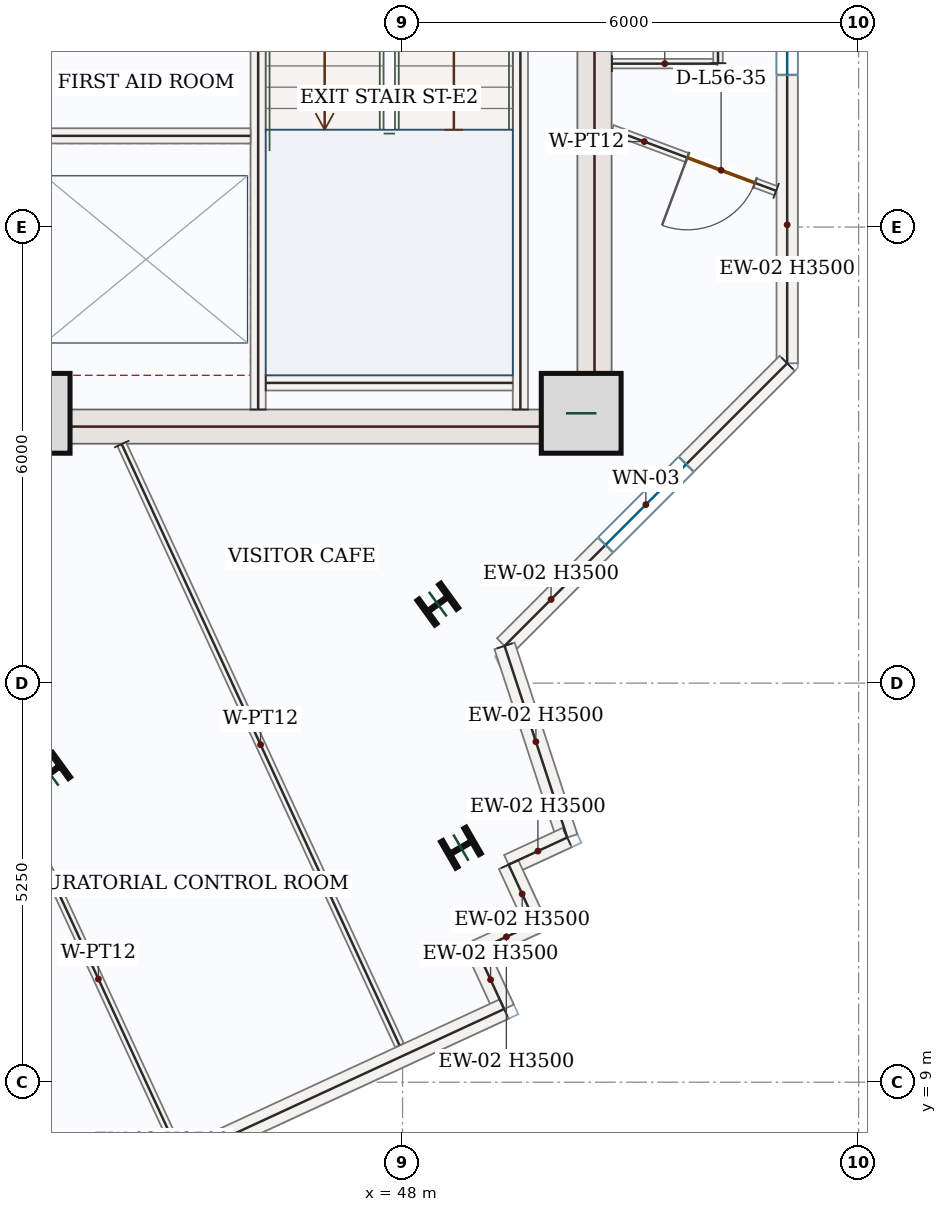
"""IFC4 building model, lengths in metres.
Left out: names, types, materials, properties, quantities, classifications, styles, units other than length and angle.
Written with IfcOpenShell. Run it as: python <this file> out.ifc"""

import sys

from ifc_helpers import new_model, si_unit, direction, frame, frame_2d, origin, origin_2d, place, context, subcontext, project, spatial, rectangle, i_section, extrude, source, transform, mapped, element, fill, save


model = new_model("IFC4")
c1 = context("Model", 3, precision=1e-05, world=origin(), true_north=direction((0.0, 1.0)))
c2 = subcontext(c1, "Body", "Model", "MODEL_VIEW")
j1 = project(units=[si_unit("LENGTHUNIT", "METRE"), si_unit("PLANEANGLEUNIT", "RADIAN")], contexts=[c1])
p1 = place(None, origin())
s1 = spatial("IfcSite", under=j1, at=p1, CompositionType="ELEMENT")
p2 = place(p1, origin())
s2 = spatial("IfcBuilding", under=s1, at=p2, CompositionType="ELEMENT")
p3 = place(p2, frame((0.0, 0.0, 239.1)))
s3 = spatial("IfcBuildingStorey", under=s2, at=p3, CompositionType="ELEMENT", Elevation=239.1)
m1 = source(origin(), c2, "Body", "SweptSolid", [
    extrude(rectangle(XDim=8.55, YDim=0.45, at=frame_2d((4.275, 0.0))), origin(), (0.0, 0.0, 1.0), 3.5),
])
p4 = place(p3, frame((50.525, 17.4, 0.0), z_axis=(0.0, 0.0, 1.0), x_axis=(0.0, 1.0, 0.0)))
e1 = element("IfcWall", 1, at=p4, inside=s3, PredefinedType="SHEAR", context=c2, shape_type="MappedRepresentation", body=[
    mapped(m1, transform((0.0, 0.0, 0.0), x_axis=(1.0, 0.0, 0.0), y_axis=(0.0, 1.0, 0.0), z_axis=(0.0, 0.0, 1.0), scale=1.0)),
])
m2 = source(origin(), c2, "Body", "SweptSolid", [
    extrude(rectangle(XDim=7.1, YDim=0.45, at=frame_2d((3.55, 0.0))), origin(), (0.0, 0.0, 1.0), 3.5),
])
p5 = place(p3, frame((43.2, 17.625, 0.0), z_axis=(0.0, 0.0, 1.0), x_axis=(1.0, 0.0, 0.0)))
e2 = element("IfcWall", 2, at=p5, inside=s3, PredefinedType="SHEAR", context=c2, shape_type="MappedRepresentation", body=[
    mapped(m2, transform((0.0, 0.0, 0.0), x_axis=(1.0, 0.0, 0.0), y_axis=(0.0, 1.0, 0.0), z_axis=(0.0, 0.0, 1.0), scale=1.0)),
])
m3 = source(origin(), c2, "Body", "SweptSolid", [
    extrude(rectangle(XDim=1.05, YDim=1.05, at=origin_2d()), origin(), (0.0, 0.0, 1.0), 3.75),
])
for number, where, z_axis, x_axis in (
    (3, (43.1, 17.8, 0.0), (0.0, 0.0, 1.0), (1.0, 0.0, 0.0)),
    (4, (50.35, 17.8, 0.0), (0.0, 0.0, 1.0), (1.0, 0.0, 0.0)),
):
    element("IfcColumn", number, at=place(p3, frame(where, z_axis=z_axis, x_axis=x_axis)), inside=s3, PredefinedType="COLUMN", context=c2, shape_type="MappedRepresentation", body=[
        mapped(m3, transform((0.0, 0.0, 0.0), x_axis=(1.0, 0.0, 0.0), y_axis=(0.0, 1.0, 0.0), z_axis=(0.0, 0.0, 1.0), scale=1.0)),
    ])
m4 = source(origin(), c2, "Body", "SweptSolid", [
    extrude(i_section(OverallWidth=0.399, OverallDepth=0.386, WebThickness=0.021, FlangeThickness=0.033, FilletRadius=0.018, at=origin_2d()), origin(), (0.0, 0.0, 1.0), 3.75),
])
for number, where, z_axis, x_axis in (
    (5, (43.357, 13.063, 0.0), (0.0, 0.0, 1.0), (-0.588, 0.809, 0.0)),
    (6, (48.464, 15.289, 0.0), (0.0, 0.0, 1.0), (-0.588, 0.809, 0.0)),
    (7, (48.768, 12.086, 0.0), (0.0, 0.0, 1.0), (-0.5, 0.866, 0.0)),
):
    element("IfcColumn", number, at=place(p3, frame(where, z_axis=z_axis, x_axis=x_axis)), inside=s3, PredefinedType="COLUMN", context=c2, shape_type="MappedRepresentation", body=[
        mapped(m4, transform((0.0, 0.0, 0.0), x_axis=(1.0, 0.0, 0.0), y_axis=(0.0, 1.0, 0.0), z_axis=(0.0, 0.0, 1.0), scale=1.0)),
    ])
p6 = place(p3, frame((53.06, 27.546, 0.0), z_axis=(0.0, 0.0, 1.0), x_axis=(0.0, -1.0, 0.0)))
e8 = element("IfcWall", 8, at=p6, inside=s3, PredefinedType="SOLIDWALL", context=c2, shape_type="SweptSolid", body=[
    extrude(rectangle(XDim=9.088, YDim=0.28, at=frame_2d((4.544, 0.0))), origin(), (0.0, 0.0, 1.0), 3.5),
])
p7 = place(p6, frame((3.794, 0.0, 0.85)))
e9 = element("IfcOpeningElement", 9, at=p7, cuts=e8, PredefinedType="OPENING", context=c2, shape_type="SweptSolid", body=[
    extrude(rectangle(XDim=1.5, YDim=1.5, at=frame_2d((0.75, 0.75))), frame((0.0, 0.15, 0.0), z_axis=(0.0, -1.0, 0.0), x_axis=(1.0, 0.0, 0.0)), (0.0, 0.0, 1.0), 0.3),
])
p8 = place(p3, frame((53.06, 18.458, 0.0), z_axis=(0.0, 0.0, 1.0), x_axis=(-0.707106781187, -0.707106781187, 0.0)))
e10 = element("IfcWall", 10, at=p8, inside=s3, PredefinedType="SOLIDWALL", context=c2, shape_type="SweptSolid", body=[
    extrude(rectangle(XDim=5.258, YDim=0.28, at=frame_2d((2.629, 0.0))), origin(), (0.0, 0.0, 1.0), 3.5),
])
p9 = place(p8, frame((1.879, 0.0, 0.85)))
e11 = element("IfcOpeningElement", 11, at=p9, cuts=e10, PredefinedType="OPENING", context=c2, shape_type="SweptSolid", body=[
    extrude(rectangle(XDim=1.5, YDim=1.5, at=frame_2d((0.75, 0.75))), frame((0.0, 0.15, 0.0), z_axis=(0.0, -1.0, 0.0), x_axis=(1.0, 0.0, 0.0)), (0.0, 0.0, 1.0), 0.3),
])
m5 = source(origin(), c2, "Body", "SweptSolid", [
    extrude(rectangle(XDim=2.652, YDim=0.28, at=frame_2d((1.326, 0.0))), origin(), (0.0, 0.0, 1.0), 3.5),
])
p10 = place(p3, frame((49.342, 14.74, 0.0), z_axis=(0.0, 0.0, 1.0), x_axis=(0.310838004308, -0.950462905682, 0.0)))
e12 = element("IfcWall", 12, at=p10, inside=s3, PredefinedType="SOLIDWALL", context=c2, shape_type="MappedRepresentation", body=[
    mapped(m5, transform((0.0, 0.0, 0.0), x_axis=(1.0, 0.0, 0.0), y_axis=(0.0, 1.0, 0.0), z_axis=(0.0, 0.0, 1.0), scale=1.0)),
])
m6 = source(origin(), c2, "Body", "SweptSolid", [
    extrude(rectangle(XDim=0.85, YDim=0.28, at=frame_2d((0.425, 0.0))), origin(), (0.0, 0.0, 1.0), 3.5),
])
for number, where, z_axis, x_axis in (
    (13, (50.167, 12.219, 0.0), (0.0, 0.0, 1.0), (-0.908, -0.419, 0.0)),
    (14, (49.395, 11.863, 0.0), (0.0, 0.0, 1.0), (0.419, -0.908, 0.0)),
):
    element("IfcWall", number, at=place(p3, frame(where, z_axis=z_axis, x_axis=x_axis)), inside=s3, PredefinedType="SOLIDWALL", context=c2, shape_type="MappedRepresentation", body=[
        mapped(m6, transform((0.0, 0.0, 0.0), x_axis=(1.0, 0.0, 0.0), y_axis=(0.0, 1.0, 0.0), z_axis=(0.0, 0.0, 1.0), scale=1.0)),
    ])
m7 = source(origin(), c2, "Body", "SweptSolid", [
    extrude(rectangle(XDim=0.85, YDim=0.28, at=frame_2d((0.425, 0.0))), origin(), (0.0, 0.0, 1.0), 3.5),
])
p11 = place(p3, frame((49.751, 11.091, 0.0), z_axis=(0.0, 0.0, 1.0), x_axis=(-0.907791150023, -0.419422493365, 0.0)))
e15 = element("IfcWall", 15, at=p11, inside=s3, PredefinedType="SOLIDWALL", context=c2, shape_type="MappedRepresentation", body=[
    mapped(m7, transform((0.0, 0.0, 0.0), x_axis=(1.0, 0.0, 0.0), y_axis=(0.0, 1.0, 0.0), z_axis=(0.0, 0.0, 1.0), scale=1.0)),
])
p12 = place(p3, frame((48.98, 10.734, 0.0), z_axis=(0.0, 0.0, 1.0), x_axis=(0.419313139191, -0.907841666427, 0.0)))
e16 = element("IfcWall", 16, at=p12, inside=s3, PredefinedType="SOLIDWALL", context=c2, shape_type="MappedRepresentation", body=[
    mapped(m6, transform((0.0, 0.0, 0.0), x_axis=(1.0, 0.0, 0.0), y_axis=(0.0, 1.0, 0.0), z_axis=(0.0, 0.0, 1.0), scale=1.0)),
])
m8 = source(origin(), c2, "Body", "SweptSolid", [
    extrude(rectangle(XDim=9.92, YDim=0.28, at=frame_2d((4.96, 0.0))), origin(), (0.0, 0.0, 1.0), 3.5),
])
p13 = place(p3, frame((49.336, 9.963, 0.0), z_axis=(0.0, 0.0, 1.0), x_axis=(-0.907779940536, -0.419446754143, 0.0)))
e17 = element("IfcWall", 17, at=p13, inside=s3, PredefinedType="SOLIDWALL", context=c2, shape_type="MappedRepresentation", body=[
    mapped(m8, transform((0.0, 0.0, 0.0), x_axis=(1.0, 0.0, 0.0), y_axis=(0.0, 1.0, 0.0), z_axis=(0.0, 0.0, 1.0), scale=1.0)),
])
m9 = source(origin(), c2, "Body", "SweptSolid", [
    extrude(rectangle(XDim=7.87, YDim=0.2, at=frame_2d((3.935, 0.0))), origin(), (0.0, 0.0, 1.0), 3.5),
])
p14 = place(p3, frame((49.55, 17.85, 0.0), z_axis=(0.0, 0.0, 1.0), x_axis=(0.0, 1.0, 0.0)))
e18 = element("IfcWall", 18, at=p14, inside=s3, PredefinedType="SOLIDWALL", context=c2, shape_type="MappedRepresentation", body=[
    mapped(m9, transform((0.0, 0.0, 0.0), x_axis=(1.0, 0.0, 0.0), y_axis=(0.0, 1.0, 0.0), z_axis=(0.0, 0.0, 1.0), scale=1.0)),
])
p15 = place(p3, frame((46.1, 17.85, 0.0), z_axis=(0.0, 0.0, 1.0), x_axis=(0.0, 1.0, 0.0)))
e19 = element("IfcWall", 19, at=p15, inside=s3, PredefinedType="SOLIDWALL", context=c2, shape_type="SweptSolid", body=[
    extrude(rectangle(XDim=8.0, YDim=0.2, at=frame_2d((4.0, 0.0))), origin(), (0.0, 0.0, 1.0), 3.5),
])
p16 = place(p15, frame((6.3, 0.0, 0.0)))
e20 = element("IfcOpeningElement", 20, at=p16, cuts=e19, PredefinedType="OPENING", context=c2, shape_type="SweptSolid", body=[
    extrude(rectangle(XDim=1.05, YDim=2.15, at=frame_2d((0.525, 1.075))), frame((0.0, 0.11, 0.0), z_axis=(0.0, -1.0, 0.0), x_axis=(1.0, 0.0, 0.0)), (0.0, 0.0, 1.0), 0.22),
])
m10 = source(origin(), c2, "Body", "SweptSolid", [
    extrude(rectangle(XDim=3.25, YDim=0.2, at=frame_2d((1.625, 0.0))), origin(), (0.0, 0.0, 1.0), 3.5),
])
p17 = place(p3, frame((46.2, 18.2, 0.0), z_axis=(0.0, 0.0, 1.0), x_axis=(1.0, 0.0, 0.0)))
e21 = element("IfcWall", 21, at=p17, inside=s3, PredefinedType="SOLIDWALL", context=c2, shape_type="MappedRepresentation", body=[
    mapped(m10, transform((0.0, 0.0, 0.0), x_axis=(1.0, 0.0, 0.0), y_axis=(0.0, 1.0, 0.0), z_axis=(0.0, 0.0, 1.0), scale=1.0)),
])
m11 = source(origin(), c2, "Body", "SweptSolid", [
    extrude(rectangle(XDim=2.75, YDim=0.2, at=frame_2d((1.375, 0.0))), origin(), (0.0, 0.0, 1.0), 3.5),
])
p18 = place(p3, frame((43.25, 21.45, 0.0), z_axis=(0.0, 0.0, 1.0), x_axis=(1.0, 0.0, 0.0)))
e22 = element("IfcWall", 22, at=p18, inside=s3, PredefinedType="SOLIDWALL", context=c2, shape_type="MappedRepresentation", body=[
    mapped(m11, transform((0.0, 0.0, 0.0), x_axis=(1.0, 0.0, 0.0), y_axis=(0.0, 1.0, 0.0), z_axis=(0.0, 0.0, 1.0), scale=1.0)),
])
m12 = source(origin(), c2, "Body", "SweptSolid", [
    extrude(rectangle(XDim=4.904, YDim=0.125, at=frame_2d((2.452, 0.0))), origin(), (0.0, 0.0, 1.0), 3.5),
])
p19 = place(p3, frame((45.027, 8.131, 0.0), z_axis=(0.0, 0.0, 1.0), x_axis=(-0.419459107568, 0.907774232438, 0.0)))
e23 = element("IfcWall", 23, at=p19, inside=s3, PredefinedType="PARTITIONING", context=c2, shape_type="MappedRepresentation", body=[
    mapped(m12, transform((0.0, 0.0, 0.0), x_axis=(1.0, 0.0, 0.0), y_axis=(0.0, 1.0, 0.0), z_axis=(0.0, 0.0, 1.0), scale=1.0)),
])
m13 = source(origin(), c2, "Body", "SweptSolid", [
    extrude(rectangle(XDim=8.712, YDim=0.125, at=frame_2d((4.356, 0.0))), origin(), (0.0, 0.0, 1.0), 3.5),
])
p20 = place(p3, frame((44.305, 17.395, 0.0), z_axis=(0.0, 0.0, 1.0), x_axis=(0.419438424399, -0.907783789312, 0.0)))
e24 = element("IfcWall", 24, at=p20, inside=s3, PredefinedType="PARTITIONING", context=c2, shape_type="MappedRepresentation", body=[
    mapped(m13, transform((0.0, 0.0, 0.0), x_axis=(1.0, 0.0, 0.0), y_axis=(0.0, 1.0, 0.0), z_axis=(0.0, 0.0, 1.0), scale=1.0)),
])
m14 = source(origin(), c2, "Body", "SweptSolid", [
    extrude(rectangle(XDim=1.389, YDim=0.125, at=frame_2d((0.695, 0.0))), origin(), (0.0, 0.0, 1.0), 3.5),
])
p21 = place(p3, frame((50.755, 22.4, 0.0), z_axis=(0.0, 0.0, 1.0), x_axis=(1.0, 0.0, 0.0)))
e25 = element("IfcWall", 25, at=p21, inside=s3, PredefinedType="PARTITIONING", context=c2, shape_type="MappedRepresentation", body=[
    mapped(m14, transform((0.0, 0.0, 0.0), x_axis=(1.0, 0.0, 0.0), y_axis=(0.0, 1.0, 0.0), z_axis=(0.0, 0.0, 1.0), scale=1.0)),
])
p22 = place(p3, frame((52.15, 22.406, 0.0), z_axis=(0.0, 0.0, 1.0), x_axis=(-2.657666e-05, 0.999999999647, 0.0)))
e26 = element("IfcWall", 26, at=p22, inside=s3, PredefinedType="PARTITIONING", context=c2, shape_type="SweptSolid", body=[
    extrude(rectangle(XDim=9.186, YDim=0.125, at=frame_2d((4.593, 0.0))), origin(), (0.0, 0.0, 1.0), 3.5),
])
p23 = place(p22, frame((5.354, 0.0, 0.0)))
e27 = element("IfcOpeningElement", 27, at=p23, cuts=e26, PredefinedType="OPENING", context=c2, shape_type="SweptSolid", body=[
    extrude(rectangle(XDim=0.95, YDim=2.15, at=frame_2d((0.475, 1.075))), frame((0.0, 0.073, 0.0), z_axis=(0.0, -1.0, 0.0), x_axis=(1.0, 0.0, 0.0)), (0.0, 0.0, 1.0), 0.145),
])
p24 = place(p3, frame((52.915, 20.727, 0.0), z_axis=(0.0, 0.0, 1.0), x_axis=(-0.936884992217, 0.349637685839, 0.0)))
e28 = element("IfcWall", 28, at=p24, inside=s3, PredefinedType="PARTITIONING", context=c2, shape_type="SweptSolid", body=[
    extrude(rectangle(XDim=2.306, YDim=0.125, at=frame_2d((1.153, 0.0))), origin(), (0.0, 0.0, 1.0), 3.5),
])
p25 = place(p24, frame((0.298, 0.0, 0.0)))
e29 = element("IfcOpeningElement", 29, at=p25, cuts=e28, PredefinedType="OPENING", context=c2, shape_type="SweptSolid", body=[
    extrude(rectangle(XDim=0.95, YDim=2.15, at=frame_2d((0.475, 1.075))), frame((0.0, 0.073, 0.0), z_axis=(0.0, -1.0, 0.0), x_axis=(1.0, 0.0, 0.0)), (0.0, 0.0, 1.0), 0.145),
])
m15 = source(origin(), c2, "Body", "SweptSolid", [
    extrude(rectangle(XDim=1.5, YDim=1.5, at=frame_2d((0.75, 0.75))), frame((0.0, 0.03, 0.0), z_axis=(0.0, -1.0, 0.0), x_axis=(1.0, 0.0, 0.0)), (0.0, 0.0, 1.0), 0.06),
])
p26 = place(p7, origin())
e30 = element("IfcWindow", 30, at=p26, inside=s3, PartitioningType="SINGLE_PANEL", PredefinedType="WINDOW", context=c2, shape_type="MappedRepresentation", body=[
    mapped(m15, transform((0.0, 0.0, 0.0), x_axis=(1.0, 0.0, 0.0), y_axis=(0.0, 1.0, 0.0), z_axis=(0.0, 0.0, 1.0), scale=1.0)),
])
fill(e9, e30)
p27 = place(p9, origin())
e31 = element("IfcWindow", 31, at=p27, inside=s3, PartitioningType="SINGLE_PANEL", PredefinedType="WINDOW", context=c2, shape_type="MappedRepresentation", body=[
    mapped(m15, transform((0.0, 0.0, 0.0), x_axis=(1.0, 0.0, 0.0), y_axis=(0.0, 1.0, 0.0), z_axis=(0.0, 0.0, 1.0), scale=1.0)),
])
fill(e11, e31)
m16 = source(origin(), c2, "Body", "SweptSolid", [
    extrude(rectangle(XDim=0.95, YDim=2.15, at=frame_2d((0.475, 1.075))), frame((0.0, 0.025, 0.0), z_axis=(0.0, -1.0, 0.0), x_axis=(1.0, 0.0, 0.0)), (0.0, 0.0, 1.0), 0.05),
])
p28 = place(p25, origin())
e32 = element("IfcDoor", 32, at=p28, inside=s3, OperationType="SINGLE_SWING_RIGHT", PredefinedType="DOOR", context=c2, shape_type="MappedRepresentation", body=[
    mapped(m16, transform((0.0, 0.0, 0.0), x_axis=(1.0, 0.0, 0.0), y_axis=(0.0, 1.0, 0.0), z_axis=(0.0, 0.0, 1.0), scale=1.0)),
])
fill(e29, e32)
save(model, sys.argv[1])
